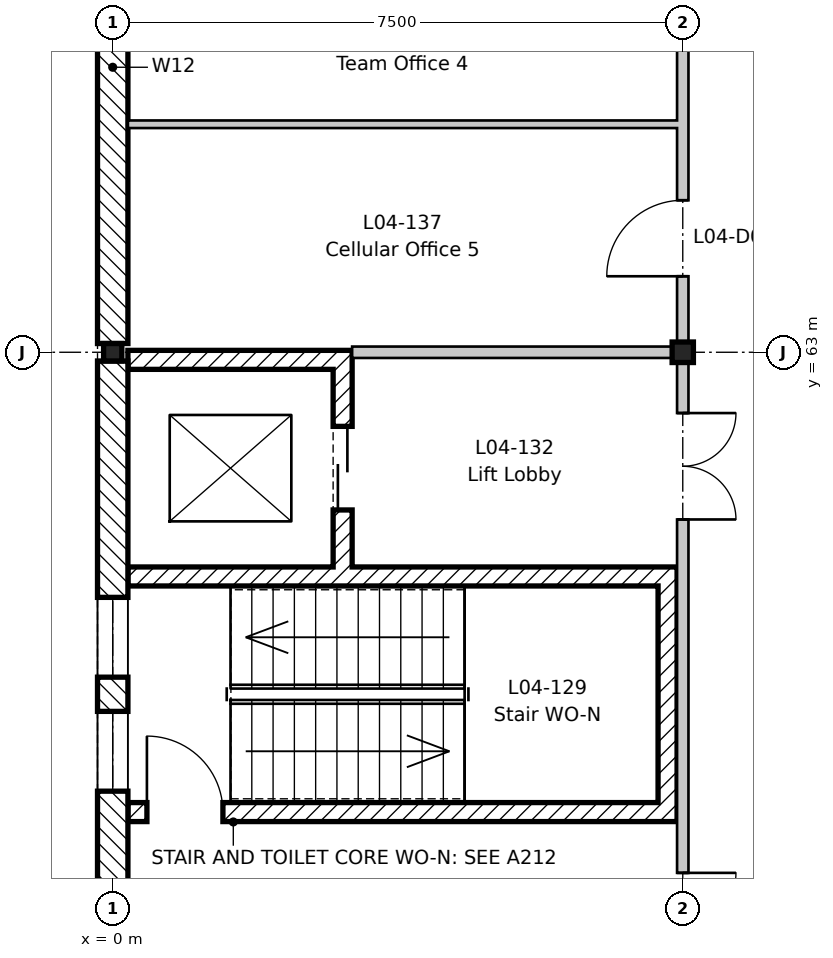
"""IFC4 building model, lengths in metres.
Left out: names, types, materials, properties, quantities, classifications, styles, units other than length and angle.
Written with IfcOpenShell. Run it as: python <this file> out.ifc"""

import sys

from ifc_helpers import new_model, si_unit, direction, frame, frame_2d, origin, origin_2d, place, context, subcontext, project, spatial, rectangle, i_section, extrude, element, fill, save


model = new_model("IFC4")
c1 = context("Model", 3, precision=1e-05, world=origin(), true_north=direction((0.0, 1.0)))
c2 = subcontext(c1, "Body", "Model", "MODEL_VIEW")
j1 = project(units=[si_unit("LENGTHUNIT", "METRE"), si_unit("PLANEANGLEUNIT", "RADIAN")], contexts=[c1])
p1 = place(None, origin())
s1 = spatial("IfcSite", under=j1, at=p1, CompositionType="ELEMENT")
p2 = place(p1, origin())
s2 = spatial("IfcBuilding", under=s1, at=p2, CompositionType="ELEMENT")
p3 = place(p2, frame((0.0, 0.0, 18.6)))
s3 = spatial("IfcBuildingStorey", under=s2, at=p3, CompositionType="ELEMENT", Elevation=18.6)
p4 = place(p3, frame((0.0, 63.0, -0.2), z_axis=(0.0, 0.0, 1.0), x_axis=(1.0, 0.0, 0.0)))
e1 = element("IfcColumn", 1, at=p4, inside=s3, PredefinedType="COLUMN", context=c2, shape_type="SweptSolid", body=[
    extrude(i_section(OverallWidth=0.24, OverallDepth=0.23, WebThickness=0.008, FlangeThickness=0.012, FilletRadius=0.021, at=origin_2d()), origin(), (0.0, 0.0, 1.0), 4.2),
])
p5 = place(p3, frame((7.5, 63.0, -0.2), z_axis=(0.0, 0.0, 1.0), x_axis=(1.0, 0.0, 0.0)))
e2 = element("IfcColumn", 2, at=p5, inside=s3, PredefinedType="COLUMN", context=c2, shape_type="SweptSolid", body=[
    extrude(i_section(OverallWidth=0.28, OverallDepth=0.27, WebThickness=0.008, FlangeThickness=0.013, FilletRadius=0.024, at=origin_2d()), origin(), (0.0, 0.0, 1.0), 4.2),
])
p6 = place(p3, frame((0.2, 56.95, 0.0), z_axis=(0.0, 0.0, 1.0), x_axis=(1.0, 0.0, 0.0)))
e3 = element("IfcWall", 3, at=p6, inside=s3, PredefinedType="SHEAR", context=c2, shape_type="SweptSolid", body=[
    extrude(rectangle(XDim=7.225, YDim=0.25, at=frame_2d((3.613, 0.0))), origin(), (0.0, 0.0, 1.0), 4.0),
])
p7 = place(p6, frame((0.25, 0.0, 0.0)))
e4 = element("IfcOpeningElement", 4, at=p7, cuts=e3, PredefinedType="OPENING", context=c2, shape_type="SweptSolid", body=[
    extrude(rectangle(XDim=1.0, YDim=2.1, at=frame_2d((0.5, 1.05))), frame((0.0, 0.135, 0.0), z_axis=(0.0, -1.0, 0.0), x_axis=(1.0, 0.0, 0.0)), (0.0, 0.0, 1.0), 0.27),
])
p8 = place(p3, frame((0.2, 60.05, 0.0), z_axis=(0.0, 0.0, 1.0), x_axis=(1.0, 0.0, 0.0)))
e5 = element("IfcWall", 5, at=p8, inside=s3, PredefinedType="SHEAR", context=c2, shape_type="SweptSolid", body=[
    extrude(rectangle(XDim=7.225, YDim=0.25, at=frame_2d((3.613, 0.0))), origin(), (0.0, 0.0, 1.0), 4.0),
])
p9 = place(p3, frame((7.3, 57.075, 0.0), z_axis=(0.0, 0.0, 1.0), x_axis=(0.0, 1.0, 0.0)))
e6 = element("IfcWall", 6, at=p9, inside=s3, PredefinedType="SHEAR", context=c2, shape_type="SweptSolid", body=[
    extrude(rectangle(XDim=2.85, YDim=0.25, at=frame_2d((1.425, 0.0))), origin(), (0.0, 0.0, 1.0), 4.0),
])
p10 = place(p3, frame((3.025, 60.175, 0.0), z_axis=(0.0, 0.0, 1.0), x_axis=(0.0, 1.0, 0.0)))
e7 = element("IfcWall", 7, at=p10, inside=s3, PredefinedType="SHEAR", context=c2, shape_type="SweptSolid", body=[
    extrude(rectangle(XDim=2.6, YDim=0.25, at=frame_2d((1.3, 0.0))), origin(), (0.0, 0.0, 1.0), 4.0),
])
p11 = place(p10, frame((0.75, 0.0, 0.0)))
e8 = element("IfcOpeningElement", 8, at=p11, cuts=e7, PredefinedType="OPENING", context=c2, shape_type="SweptSolid", body=[
    extrude(rectangle(XDim=1.1, YDim=2.1, at=frame_2d((0.55, 1.05))), frame((0.0, 0.135, 0.0), z_axis=(0.0, -1.0, 0.0), x_axis=(1.0, 0.0, 0.0)), (0.0, 0.0, 1.0), 0.27),
])
p12 = place(p3, frame((0.2, 62.9, 0.0), z_axis=(0.0, 0.0, 1.0), x_axis=(1.0, 0.0, 0.0)))
e9 = element("IfcWall", 9, at=p12, inside=s3, PredefinedType="SHEAR", context=c2, shape_type="SweptSolid", body=[
    extrude(rectangle(XDim=2.95, YDim=0.25, at=frame_2d((1.475, 0.0))), origin(), (0.0, 0.0, 1.0), 4.0),
])
p13 = place(p3, frame((0.0, 54.115, 0.0), z_axis=(0.0, 0.0, 1.0), x_axis=(0.0, 1.0, 0.0)))
e10 = element("IfcWall", 10, at=p13, inside=s3, PredefinedType="STANDARD", context=c2, shape_type="SweptSolid", body=[
    extrude(rectangle(XDim=8.77, YDim=0.4, at=frame_2d((4.385, 0.0))), origin(), (0.0, 0.0, 1.0), 3.6),
])
p14 = place(p13, frame((3.11, 0.0, 0.9)))
e11 = element("IfcOpeningElement", 11, at=p14, cuts=e10, PredefinedType="OPENING", context=c2, shape_type="SweptSolid", body=[
    extrude(rectangle(XDim=1.05, YDim=2.6, at=frame_2d((0.525, 1.3))), frame((0.0, 0.21, 0.0), z_axis=(0.0, -1.0, 0.0), x_axis=(1.0, 0.0, 0.0)), (0.0, 0.0, 1.0), 0.42),
])
p15 = place(p13, frame((4.61, 0.0, 0.9)))
e12 = element("IfcOpeningElement", 12, at=p15, cuts=e10, PredefinedType="OPENING", context=c2, shape_type="SweptSolid", body=[
    extrude(rectangle(XDim=1.05, YDim=2.6, at=frame_2d((0.525, 1.3))), frame((0.0, 0.21, 0.0), z_axis=(0.0, -1.0, 0.0), x_axis=(1.0, 0.0, 0.0)), (0.0, 0.0, 1.0), 0.42),
])
p16 = place(p3, frame((0.0, 63.115, 0.0), z_axis=(0.0, 0.0, 1.0), x_axis=(0.0, 1.0, 0.0)))
e13 = element("IfcWall", 13, at=p16, inside=s3, PredefinedType="STANDARD", context=c2, shape_type="SweptSolid", body=[
    extrude(rectangle(XDim=7.27, YDim=0.4, at=frame_2d((3.635, 0.0))), origin(), (0.0, 0.0, 1.0), 3.6),
])
p17 = place(p3, frame((7.5, -8.8, 0.0), z_axis=(0.0, 0.0, 1.0), x_axis=(0.0, 1.0, 0.0)))
e14 = element("IfcWall", 14, at=p17, inside=s3, PredefinedType="PARTITIONING", context=c2, shape_type="SweptSolid", body=[
    extrude(rectangle(XDim=79.3, YDim=0.15, at=frame_2d((39.65, 0.0))), origin(), (0.0, 0.0, 1.0), 3.48),
])
p18 = place(p17, frame((20.3, 0.0, 0.0)))
e15 = element("IfcOpeningElement", 15, at=p18, cuts=e14, PredefinedType="OPENING", context=c2, shape_type="SweptSolid", body=[
    extrude(rectangle(XDim=1.0, YDim=2.1, at=frame_2d((0.5, 1.05))), frame((0.0, 0.085, 0.0), z_axis=(0.0, -1.0, 0.0), x_axis=(1.0, 0.0, 0.0)), (0.0, 0.0, 1.0), 0.17),
])
p19 = place(p17, frame((24.8, 0.0, 0.0)))
e16 = element("IfcOpeningElement", 16, at=p19, cuts=e14, PredefinedType="OPENING", context=c2, shape_type="SweptSolid", body=[
    extrude(rectangle(XDim=1.0, YDim=2.1, at=frame_2d((0.5, 1.05))), frame((0.0, 0.085, 0.0), z_axis=(0.0, -1.0, 0.0), x_axis=(1.0, 0.0, 0.0)), (0.0, 0.0, 1.0), 0.17),
])
p20 = place(p17, frame((30.6, 0.0, 0.0)))
e17 = element("IfcOpeningElement", 17, at=p20, cuts=e14, PredefinedType="OPENING", context=c2, shape_type="SweptSolid", body=[
    extrude(rectangle(XDim=1.4, YDim=2.1, at=frame_2d((0.7, 1.05))), frame((0.0, 0.085, 0.0), z_axis=(0.0, -1.0, 0.0), x_axis=(1.0, 0.0, 0.0)), (0.0, 0.0, 1.0), 0.17),
])
p21 = place(p17, frame((47.3, 0.0, 0.0)))
e18 = element("IfcOpeningElement", 18, at=p21, cuts=e14, PredefinedType="OPENING", context=c2, shape_type="SweptSolid", body=[
    extrude(rectangle(XDim=1.0, YDim=2.1, at=frame_2d((0.5, 1.05))), frame((0.0, 0.085, 0.0), z_axis=(0.0, -1.0, 0.0), x_axis=(1.0, 0.0, 0.0)), (0.0, 0.0, 1.0), 0.17),
])
p22 = place(p17, frame((51.8, 0.0, 0.0)))
e19 = element("IfcOpeningElement", 19, at=p22, cuts=e14, PredefinedType="OPENING", context=c2, shape_type="SweptSolid", body=[
    extrude(rectangle(XDim=1.0, YDim=2.1, at=frame_2d((0.5, 1.05))), frame((0.0, 0.085, 0.0), z_axis=(0.0, -1.0, 0.0), x_axis=(1.0, 0.0, 0.0)), (0.0, 0.0, 1.0), 0.17),
])
p23 = place(p17, frame((54.8, 0.0, 0.0)))
e20 = element("IfcOpeningElement", 20, at=p23, cuts=e14, PredefinedType="OPENING", context=c2, shape_type="SweptSolid", body=[
    extrude(rectangle(XDim=1.0, YDim=2.1, at=frame_2d((0.5, 1.05))), frame((0.0, 0.085, 0.0), z_axis=(0.0, -1.0, 0.0), x_axis=(1.0, 0.0, 0.0)), (0.0, 0.0, 1.0), 0.17),
])
p24 = place(p17, frame((59.3, 0.0, 0.0)))
e21 = element("IfcOpeningElement", 21, at=p24, cuts=e14, PredefinedType="OPENING", context=c2, shape_type="SweptSolid", body=[
    extrude(rectangle(XDim=1.0, YDim=2.1, at=frame_2d((0.5, 1.05))), frame((0.0, 0.085, 0.0), z_axis=(0.0, -1.0, 0.0), x_axis=(1.0, 0.0, 0.0)), (0.0, 0.0, 1.0), 0.17),
])
p25 = place(p17, frame((12.6, 0.0, 0.0)))
e22 = element("IfcOpeningElement", 22, at=p25, cuts=e14, PredefinedType="OPENING", context=c2, shape_type="SweptSolid", body=[
    extrude(rectangle(XDim=1.4, YDim=2.1, at=frame_2d((0.7, 1.05))), frame((0.0, 0.085, 0.0), z_axis=(0.0, -1.0, 0.0), x_axis=(1.0, 0.0, 0.0)), (0.0, 0.0, 1.0), 0.17),
])
p26 = place(p17, frame((3.6, 0.0, 0.0)))
e23 = element("IfcOpeningElement", 23, at=p26, cuts=e14, PredefinedType="OPENING", context=c2, shape_type="SweptSolid", body=[
    extrude(rectangle(XDim=1.4, YDim=2.1, at=frame_2d((0.7, 1.05))), frame((0.0, 0.085, 0.0), z_axis=(0.0, -1.0, 0.0), x_axis=(1.0, 0.0, 0.0)), (0.0, 0.0, 1.0), 0.17),
])
p27 = place(p17, frame((63.55, 0.0, 0.0)))
e24 = element("IfcOpeningElement", 24, at=p27, cuts=e14, PredefinedType="OPENING", context=c2, shape_type="SweptSolid", body=[
    extrude(rectangle(XDim=1.4, YDim=2.1, at=frame_2d((0.7, 1.05))), frame((0.0, 0.085, 0.0), z_axis=(0.0, -1.0, 0.0), x_axis=(1.0, 0.0, 0.0)), (0.0, 0.0, 1.0), 0.17),
])
p28 = place(p17, frame((69.6, 0.0, 0.0)))
e25 = element("IfcOpeningElement", 25, at=p28, cuts=e14, PredefinedType="OPENING", context=c2, shape_type="SweptSolid", body=[
    extrude(rectangle(XDim=1.4, YDim=2.1, at=frame_2d((0.7, 1.05))), frame((0.0, 0.085, 0.0), z_axis=(0.0, -1.0, 0.0), x_axis=(1.0, 0.0, 0.0)), (0.0, 0.0, 1.0), 0.17),
])
p29 = place(p17, frame((42.85, 0.0, 0.0)))
e26 = element("IfcOpeningElement", 26, at=p29, cuts=e14, PredefinedType="OPENING", context=c2, shape_type="SweptSolid", body=[
    extrude(rectangle(XDim=1.0, YDim=2.1, at=frame_2d((0.5, 1.05))), frame((0.0, 0.085, 0.0), z_axis=(0.0, -1.0, 0.0), x_axis=(1.0, 0.0, 0.0)), (0.0, 0.0, 1.0), 0.17),
])
p30 = place(p17, frame((36.55, 0.0, 0.0)))
e27 = element("IfcOpeningElement", 27, at=p30, cuts=e14, PredefinedType="OPENING", context=c2, shape_type="SweptSolid", body=[
    extrude(rectangle(XDim=1.4, YDim=2.1, at=frame_2d((0.7, 1.05))), frame((0.0, 0.085, 0.0), z_axis=(0.0, -1.0, 0.0), x_axis=(1.0, 0.0, 0.0)), (0.0, 0.0, 1.0), 0.17),
])
p31 = place(p17, frame((72.8, 0.0, 0.0)))
e28 = element("IfcOpeningElement", 28, at=p31, cuts=e14, PredefinedType="OPENING", context=c2, shape_type="SweptSolid", body=[
    extrude(rectangle(XDim=1.0, YDim=2.1, at=frame_2d((0.5, 1.05))), frame((0.0, 0.085, 0.0), z_axis=(0.0, -1.0, 0.0), x_axis=(1.0, 0.0, 0.0)), (0.0, 0.0, 1.0), 0.17),
])
p32 = place(p3, frame((3.15, 63.0, 0.0), z_axis=(0.0, 0.0, 1.0), x_axis=(1.0, 0.0, 0.0)))
e29 = element("IfcWall", 29, at=p32, inside=s3, PredefinedType="PARTITIONING", context=c2, shape_type="SweptSolid", body=[
    extrude(rectangle(XDim=4.275, YDim=0.15, at=frame_2d((2.138, 0.0))), origin(), (0.0, 0.0, 1.0), 3.65),
])
p33 = place(p3, frame((0.2, 66.0, 0.0), z_axis=(0.0, 0.0, 1.0), x_axis=(1.0, 0.0, 0.0)))
e30 = element("IfcWall", 30, at=p33, inside=s3, PredefinedType="PARTITIONING", context=c2, shape_type="SweptSolid", body=[
    extrude(rectangle(XDim=7.225, YDim=0.1, at=frame_2d((3.613, 0.0))), origin(), (0.0, 0.0, 1.0), 4.0),
])
p34 = place(p14, origin())
e31 = element("IfcWindow", 31, at=p34, inside=s3, PartitioningType="SINGLE_PANEL", PredefinedType="WINDOW", context=c2, shape_type="SweptSolid", body=[
    extrude(rectangle(XDim=1.05, YDim=2.6, at=frame_2d((0.525, 1.3))), frame((0.0, 0.03, 0.0), z_axis=(0.0, -1.0, 0.0), x_axis=(1.0, 0.0, 0.0)), (0.0, 0.0, 1.0), 0.06),
])
fill(e11, e31)
p35 = place(p15, origin())
e32 = element("IfcWindow", 32, at=p35, inside=s3, PartitioningType="SINGLE_PANEL", PredefinedType="WINDOW", context=c2, shape_type="SweptSolid", body=[
    extrude(rectangle(XDim=1.05, YDim=2.6, at=frame_2d((0.525, 1.3))), frame((0.0, 0.03, 0.0), z_axis=(0.0, -1.0, 0.0), x_axis=(1.0, 0.0, 0.0)), (0.0, 0.0, 1.0), 0.06),
])
fill(e12, e32)
p36 = place(p7, origin())
e33 = element("IfcDoor", 33, at=p36, inside=s3, OperationType="SINGLE_SWING_LEFT", PredefinedType="DOOR", context=c2, shape_type="SweptSolid", body=[
    extrude(rectangle(XDim=1.0, YDim=2.1, at=frame_2d((0.5, 1.05))), frame((0.0, 0.025, 0.0), z_axis=(0.0, -1.0, 0.0), x_axis=(1.0, 0.0, 0.0)), (0.0, 0.0, 1.0), 0.05),
])
fill(e4, e33)
p37 = place(p27, frame((1.4, 0.0, 0.0), z_axis=(0.0, 0.0, 1.0), x_axis=(-1.0, 0.0, 0.0)))
e34 = element("IfcDoor", 34, at=p37, inside=s3, OperationType="DOUBLE_DOOR_SINGLE_SWING", PredefinedType="DOOR", context=c2, shape_type="SweptSolid", body=[
    extrude(rectangle(XDim=1.4, YDim=2.1, at=frame_2d((0.7, 1.05))), frame((0.0, 0.025, 0.0), z_axis=(0.0, -1.0, 0.0), x_axis=(1.0, 0.0, 0.0)), (0.0, 0.0, 1.0), 0.05),
])
fill(e24, e34)
p38 = place(p28, frame((1.4, 0.0, 0.0), z_axis=(0.0, 0.0, 1.0), x_axis=(-1.0, 0.0, 0.0)))
e35 = element("IfcDoor", 35, at=p38, inside=s3, OperationType="DOUBLE_DOOR_SINGLE_SWING", PredefinedType="DOOR", context=c2, shape_type="SweptSolid", body=[
    extrude(rectangle(XDim=1.4, YDim=2.1, at=frame_2d((0.7, 1.05))), frame((0.0, 0.025, 0.0), z_axis=(0.0, -1.0, 0.0), x_axis=(1.0, 0.0, 0.0)), (0.0, 0.0, 1.0), 0.05),
])
fill(e25, e35)
p39 = place(p31, origin())
e36 = element("IfcDoor", 36, at=p39, inside=s3, OperationType="SINGLE_SWING_LEFT", PredefinedType="DOOR", context=c2, shape_type="SweptSolid", body=[
    extrude(rectangle(XDim=1.0, YDim=2.1, at=frame_2d((0.5, 1.05))), frame((0.0, 0.025, 0.0), z_axis=(0.0, -1.0, 0.0), x_axis=(1.0, 0.0, 0.0)), (0.0, 0.0, 1.0), 0.05),
])
fill(e28, e36)
p40 = place(p11, origin())
e37 = element("IfcDoor", 37, at=p40, inside=s3, OperationType="SLIDING_TO_LEFT", PredefinedType="DOOR", context=c2, shape_type="SweptSolid", body=[
    extrude(rectangle(XDim=1.1, YDim=2.1, at=frame_2d((0.55, 1.05))), frame((0.0, 0.025, 0.0), z_axis=(0.0, -1.0, 0.0), x_axis=(1.0, 0.0, 0.0)), (0.0, 0.0, 1.0), 0.05),
])
fill(e8, e37)
save(model, sys.argv[1])
